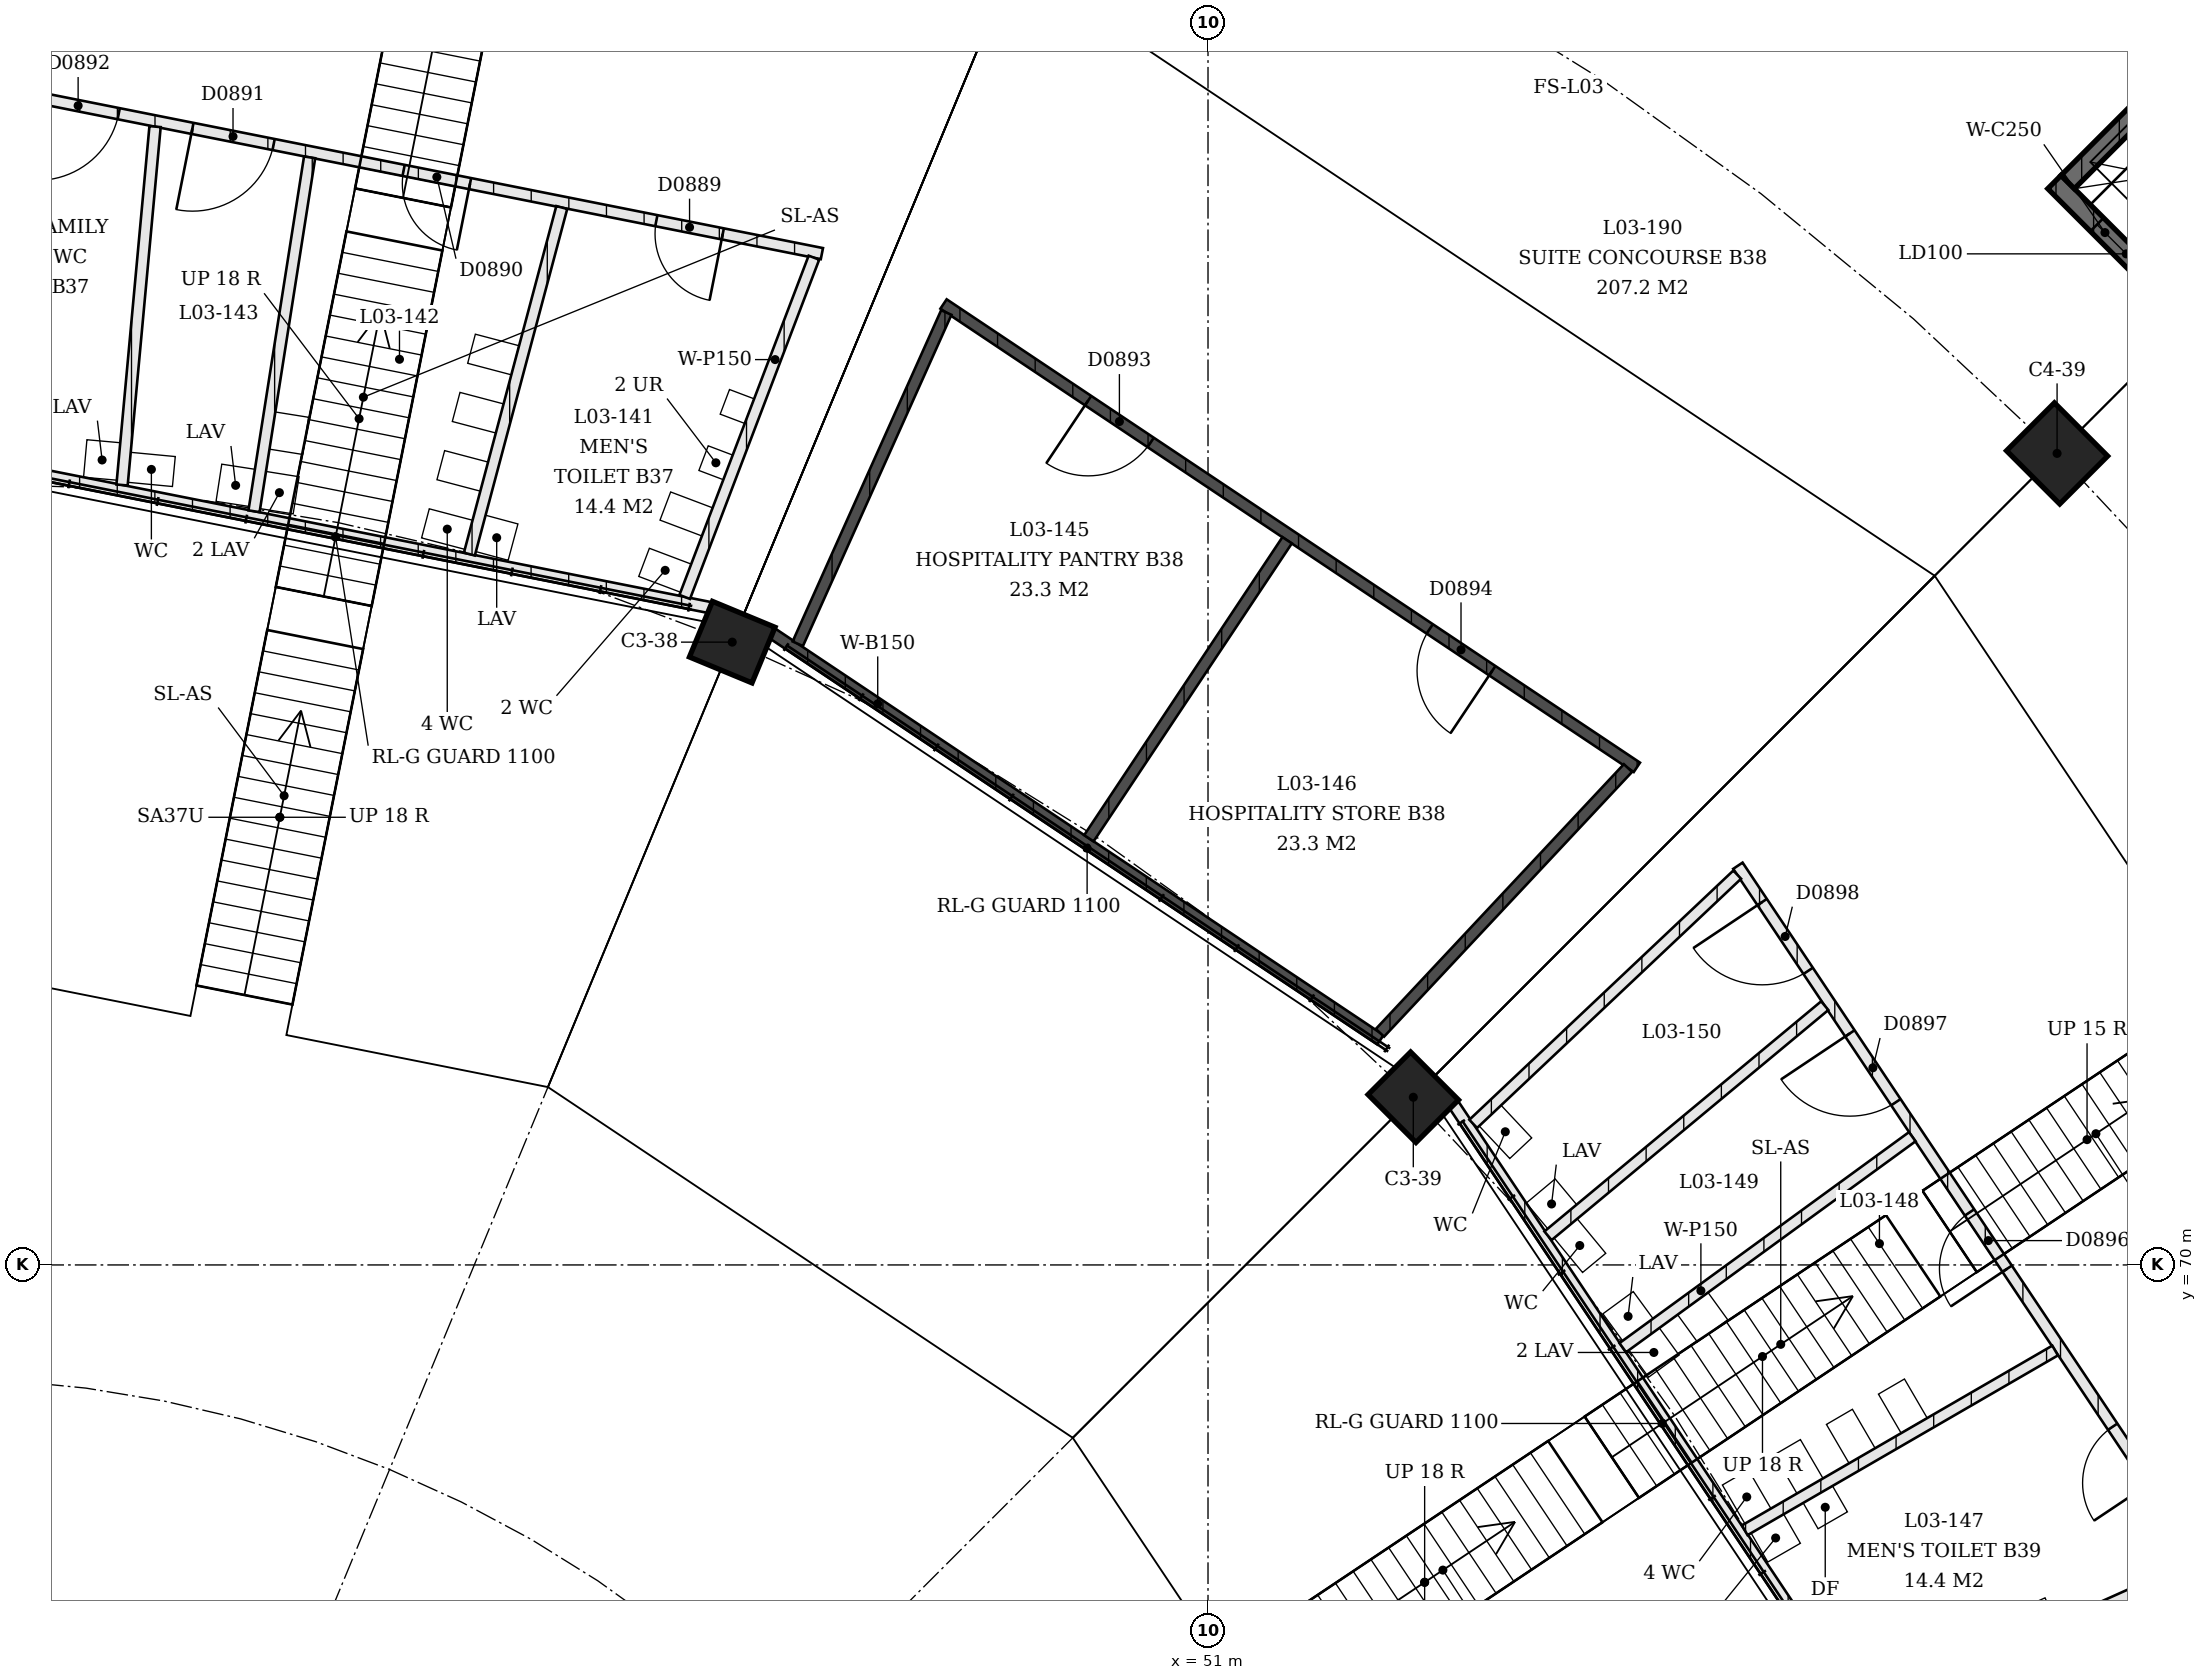
"""IFC4 building model, lengths in metres.
Left out: names, types, materials, properties, quantities, classifications, styles, units other than length and angle.
Written with IfcOpenShell. Run it as: python <this file> out.ifc"""

import sys

from ifc_helpers import new_model, si_unit, direction, frame, frame_2d, origin, origin_2d, place, context, subcontext, project, spatial, rectangle, extrude, element, fill, save


model = new_model("IFC4")
c1 = context("Model", 3, precision=1e-05, world=origin(), true_north=direction((0.0, 1.0)))
c2 = subcontext(c1, "Body", "Model", "MODEL_VIEW")
j1 = project(units=[si_unit("LENGTHUNIT", "METRE"), si_unit("PLANEANGLEUNIT", "RADIAN")], contexts=[c1])
p1 = place(None, origin())
s1 = spatial("IfcSite", under=j1, at=p1, CompositionType="ELEMENT")
p2 = place(p1, origin())
s2 = spatial("IfcBuilding", under=s1, at=p2, CompositionType="ELEMENT")
p3 = place(p2, frame((0.0, 0.0, 13.5)))
s3 = spatial("IfcBuildingStorey", under=s2, at=p3, CompositionType="ELEMENT", Elevation=13.5)
for number, where, z_axis, x_axis in (
    (1, (44.677, 78.276, 0.0), (0.0, 0.0, 1.0), (-0.924, 0.383, 0.0)),
    (2, (53.728, 72.228, 0.0), (0.0, 0.0, 1.0), (-0.707, 0.707, 0.0)),
):
    element("IfcColumn", number, at=place(p3, frame(where, z_axis=z_axis, x_axis=x_axis)), inside=s3, PredefinedType="COLUMN", context=c2, shape_type="SweptSolid", body=[
        extrude(rectangle(XDim=0.9, YDim=0.8, at=origin_2d()), origin(), (0.0, 0.0, 1.0), 2.033),
    ])
p4 = place(p3, frame((62.284, 80.784, 0.0), z_axis=(0.0, 0.0, 1.0), x_axis=(-0.707106781187, 0.707106781187, 0.0)))
e3 = element("IfcColumn", 3, at=p4, inside=s3, PredefinedType="COLUMN", context=c2, shape_type="SweptSolid", body=[
    extrude(rectangle(XDim=1.0, YDim=0.9, at=origin_2d()), origin(), (0.0, 0.0, 1.0), 4.5),
])
p5 = place(p3, frame((65.891, 80.749, 0.0), z_axis=(0.0, 0.0, 1.0), x_axis=(-0.707106781187, 0.707106781187, 0.0)))
e4 = element("IfcWall", 4, at=p5, inside=s3, PredefinedType="SHEAR", context=c2, shape_type="SweptSolid", body=[
    extrude(rectangle(XDim=5.15, YDim=0.25, at=frame_2d((2.575, 0.0))), origin(), (0.0, 0.0, 1.0), 4.09),
])
p6 = place(p5, frame((0.8, 0.0, 0.0)))
e5 = element("IfcOpeningElement", 5, at=p6, cuts=e4, PredefinedType="OPENING", context=c2, shape_type="SweptSolid", body=[
    extrude(rectangle(XDim=1.1, YDim=2.1, at=frame_2d((0.55, 1.05))), frame((0.0, 0.125, 0.0), z_axis=(0.0, -1.0, 0.0), x_axis=(1.0, 0.0, 0.0)), (0.0, 0.0, 1.0), 0.25),
])
p7 = place(p5, frame((3.25, 0.0, 0.0)))
e6 = element("IfcOpeningElement", 6, at=p7, cuts=e4, PredefinedType="OPENING", context=c2, shape_type="SweptSolid", body=[
    extrude(rectangle(XDim=1.1, YDim=2.1, at=frame_2d((0.55, 1.05))), frame((0.0, 0.125, 0.0), z_axis=(0.0, -1.0, 0.0), x_axis=(1.0, 0.0, 0.0)), (0.0, 0.0, 1.0), 0.25),
])
p8 = place(p3, frame((62.426, 84.391, 0.0), z_axis=(0.0, 0.0, 1.0), x_axis=(0.707147472125, 0.707066087907, 0.0)))
e7 = element("IfcWall", 7, at=p8, inside=s3, PredefinedType="SHEAR", context=c2, shape_type="SweptSolid", body=[
    extrude(rectangle(XDim=3.0, YDim=0.25, at=frame_2d((1.5, 0.0))), origin(), (0.0, 0.0, 1.0), 4.09),
])
p9 = place(p3, frame((44.38, 78.735, 0.0), z_axis=(0.0, 0.0, 1.0), x_axis=(-0.980786564352, 0.19508386706, 0.0)))
e8 = element("IfcWall", 8, at=p9, inside=s3, PredefinedType="PARTITIONING", context=c2, shape_type="SweptSolid", body=[
    extrude(rectangle(XDim=9.825, YDim=0.15, at=frame_2d((4.913, 0.0))), origin(), (0.0, 0.0, 1.0), 3.0),
])
p10 = place(p3, frame((45.869, 83.439, 0.0), z_axis=(0.0, 0.0, 1.0), x_axis=(-0.980786208969, 0.195085653744, 0.0)))
e9 = element("IfcWall", 9, at=p10, inside=s3, PredefinedType="PARTITIONING", context=c2, shape_type="SweptSolid", body=[
    extrude(rectangle(XDim=11.209, YDim=0.15, at=frame_2d((5.604, 0.0))), origin(), (0.0, 0.0, 1.0), 3.0),
])
p11 = place(p10, frame((1.343, 0.0, 0.0)))
e10 = element("IfcOpeningElement", 10, at=p11, cuts=e9, PredefinedType="OPENING", context=c2, shape_type="SweptSolid", body=[
    extrude(rectangle(XDim=0.9, YDim=2.1, at=frame_2d((0.45, 1.05))), frame((0.0, 0.075, 0.0), z_axis=(0.0, -1.0, 0.0), x_axis=(1.0, 0.0, 0.0)), (0.0, 0.0, 1.0), 0.15),
])
p12 = place(p10, frame((4.768, 0.0, 0.0)))
e11 = element("IfcOpeningElement", 11, at=p12, cuts=e9, PredefinedType="OPENING", context=c2, shape_type="SweptSolid", body=[
    extrude(rectangle(XDim=0.9, YDim=2.1, at=frame_2d((0.45, 1.05))), frame((0.0, 0.075, 0.0), z_axis=(0.0, -1.0, 0.0), x_axis=(1.0, 0.0, 0.0)), (0.0, 0.0, 1.0), 0.15),
])
p13 = place(p10, frame((7.43, 0.0, 0.0)))
e12 = element("IfcOpeningElement", 12, at=p13, cuts=e9, PredefinedType="OPENING", context=c2, shape_type="SweptSolid", body=[
    extrude(rectangle(XDim=1.1, YDim=2.1, at=frame_2d((0.55, 1.05))), frame((0.0, 0.075, 0.0), z_axis=(0.0, -1.0, 0.0), x_axis=(1.0, 0.0, 0.0)), (0.0, 0.0, 1.0), 0.15),
])
p14 = place(p10, frame((9.529, 0.0, 0.0)))
e13 = element("IfcOpeningElement", 13, at=p14, cuts=e9, PredefinedType="OPENING", context=c2, shape_type="SweptSolid", body=[
    extrude(rectangle(XDim=1.1, YDim=2.1, at=frame_2d((0.55, 1.05))), frame((0.0, 0.075, 0.0), z_axis=(0.0, -1.0, 0.0), x_axis=(1.0, 0.0, 0.0)), (0.0, 0.0, 1.0), 0.15),
])
p15 = place(p3, frame((44.045, 78.877, 0.0), z_axis=(0.0, 0.0, 1.0), x_axis=(0.355921670207, 0.934515791561, 0.0)))
e14 = element("IfcWall", 14, at=p15, inside=s3, PredefinedType="PARTITIONING", context=c2, shape_type="SweptSolid", body=[
    extrude(rectangle(XDim=4.824, YDim=0.15, at=frame_2d((2.412, 0.0))), origin(), (0.0, 0.0, 1.0), 3.0),
])
p16 = place(p3, frame((41.183, 79.446, 0.0), z_axis=(0.0, 0.0, 1.0), x_axis=(0.257618021969, 0.966246839455, 0.0)))
e15 = element("IfcWall", 15, at=p16, inside=s3, PredefinedType="PARTITIONING", context=c2, shape_type="SweptSolid", body=[
    extrude(rectangle(XDim=4.767, YDim=0.15, at=frame_2d((2.383, 0.0))), origin(), (0.0, 0.0, 1.0), 3.0),
])
p17 = place(p3, frame((38.322, 80.015, 0.0), z_axis=(0.0, 0.0, 1.0), x_axis=(0.155127731688, 0.987894420908, 0.0)))
e16 = element("IfcWall", 16, at=p17, inside=s3, PredefinedType="PARTITIONING", context=c2, shape_type="SweptSolid", body=[
    extrude(rectangle(XDim=4.761, YDim=0.15, at=frame_2d((2.38, 0.0))), origin(), (0.0, 0.0, 1.0), 3.0),
])
p18 = place(p3, frame((36.567, 80.364, 0.0), z_axis=(0.0, 0.0, 1.0), x_axis=(0.091727705385, 0.995784127241, 0.0)))
e17 = element("IfcWall", 17, at=p18, inside=s3, PredefinedType="PARTITIONING", context=c2, shape_type="SweptSolid", body=[
    extrude(rectangle(XDim=4.783, YDim=0.15, at=frame_2d((2.392, 0.0))), origin(), (0.0, 0.0, 1.0), 3.0),
])
p19 = place(p3, frame((45.211, 78.391, 0.0), z_axis=(0.0, 0.0, 1.0), x_axis=(0.831470078842, -0.555569534793, 0.0)))
e18 = element("IfcWall", 18, at=p19, inside=s3, PredefinedType="SOLIDWALL", context=c2, shape_type="SweptSolid", body=[
    extrude(rectangle(XDim=9.718, YDim=0.15, at=frame_2d((4.859, 0.0))), origin(), (0.0, 0.0, 1.0), 3.0),
])
p20 = place(p3, frame((47.485, 82.77, 0.0), z_axis=(0.0, 0.0, 1.0), x_axis=(0.831470287315, -0.555569222791, 0.0)))
e19 = element("IfcWall", 19, at=p20, inside=s3, PredefinedType="SOLIDWALL", context=c2, shape_type="SweptSolid", body=[
    extrude(rectangle(XDim=11.082, YDim=0.15, at=frame_2d((5.541, 0.0))), origin(), (0.0, 0.0, 1.0), 3.0),
])
p21 = place(p20, frame((2.311, 0.0, 0.0)))
e20 = element("IfcOpeningElement", 20, at=p21, cuts=e19, PredefinedType="OPENING", context=c2, shape_type="SweptSolid", body=[
    extrude(rectangle(XDim=1.0, YDim=2.1, at=frame_2d((0.5, 1.05))), frame((0.0, 0.075, 0.0), z_axis=(0.0, -1.0, 0.0), x_axis=(1.0, 0.0, 0.0)), (0.0, 0.0, 1.0), 0.15),
])
p22 = place(p20, frame((7.771, 0.0, 0.0)))
e21 = element("IfcOpeningElement", 21, at=p22, cuts=e19, PredefinedType="OPENING", context=c2, shape_type="SweptSolid", body=[
    extrude(rectangle(XDim=1.0, YDim=2.1, at=frame_2d((0.5, 1.05))), frame((0.0, 0.075, 0.0), z_axis=(0.0, -1.0, 0.0), x_axis=(1.0, 0.0, 0.0)), (0.0, 0.0, 1.0), 0.15),
])
p23 = place(p3, frame((45.548, 78.254, 0.0), z_axis=(0.0, 0.0, 1.0), x_axis=(0.409145990025, 0.912468935825, 0.0)))
e22 = element("IfcWall", 22, at=p23, inside=s3, PredefinedType="SOLIDWALL", context=c2, shape_type="SweptSolid", body=[
    extrude(rectangle(XDim=4.824, YDim=0.15, at=frame_2d((2.412, 0.0))), origin(), (0.0, 0.0, 1.0), 3.0),
])
p24 = place(p3, frame((49.417, 75.67, 0.0), z_axis=(0.0, 0.0, 1.0), x_axis=(0.553989356348, 0.832523749243, 0.0)))
e23 = element("IfcWall", 23, at=p24, inside=s3, PredefinedType="SOLIDWALL", context=c2, shape_type="SweptSolid", body=[
    extrude(rectangle(XDim=4.757, YDim=0.15, at=frame_2d((2.378, 0.0))), origin(), (0.0, 0.0, 1.0), 3.0),
])
p25 = place(p3, frame((53.285, 73.085, 0.0), z_axis=(0.0, 0.0, 1.0), x_axis=(0.68366483381, 0.729796132499, 0.0)))
e24 = element("IfcWall", 24, at=p25, inside=s3, PredefinedType="SOLIDWALL", context=c2, shape_type="SweptSolid", body=[
    extrude(rectangle(XDim=4.821, YDim=0.15, at=frame_2d((2.411, 0.0))), origin(), (0.0, 0.0, 1.0), 3.0),
])
p26 = place(p3, frame((59.891, 63.711, 0.0), z_axis=(0.0, 0.0, 1.0), x_axis=(-0.555562437394, 0.83147482112, 0.0)))
e25 = element("IfcWall", 25, at=p26, inside=s3, PredefinedType="PARTITIONING", context=c2, shape_type="SweptSolid", body=[
    extrude(rectangle(XDim=10.125, YDim=0.15, at=frame_2d((5.062, 0.0))), origin(), (0.0, 0.0, 1.0), 3.0),
])
p27 = place(p3, frame((64.27, 65.985, 0.0), z_axis=(0.0, 0.0, 1.0), x_axis=(-0.555569460176, 0.8314701287, 0.0)))
e26 = element("IfcWall", 26, at=p27, inside=s3, PredefinedType="PARTITIONING", context=c2, shape_type="SweptSolid", body=[
    extrude(rectangle(XDim=11.209, YDim=0.15, at=frame_2d((5.604, 0.0))), origin(), (0.0, 0.0, 1.0), 3.0),
])
p28 = place(p27, frame((1.343, 0.0, 0.0)))
e27 = element("IfcOpeningElement", 27, at=p28, cuts=e26, PredefinedType="OPENING", context=c2, shape_type="SweptSolid", body=[
    extrude(rectangle(XDim=0.9, YDim=2.1, at=frame_2d((0.45, 1.05))), frame((0.0, 0.075, 0.0), z_axis=(0.0, -1.0, 0.0), x_axis=(1.0, 0.0, 0.0)), (0.0, 0.0, 1.0), 0.15),
])
p29 = place(p27, frame((4.768, 0.0, 0.0)))
e28 = element("IfcOpeningElement", 28, at=p29, cuts=e26, PredefinedType="OPENING", context=c2, shape_type="SweptSolid", body=[
    extrude(rectangle(XDim=0.9, YDim=2.1, at=frame_2d((0.45, 1.05))), frame((0.0, 0.075, 0.0), z_axis=(0.0, -1.0, 0.0), x_axis=(1.0, 0.0, 0.0)), (0.0, 0.0, 1.0), 0.15),
])
p30 = place(p27, frame((7.43, 0.0, 0.0)))
e29 = element("IfcOpeningElement", 29, at=p30, cuts=e26, PredefinedType="OPENING", context=c2, shape_type="SweptSolid", body=[
    extrude(rectangle(XDim=1.1, YDim=2.1, at=frame_2d((0.55, 1.05))), frame((0.0, 0.075, 0.0), z_axis=(0.0, -1.0, 0.0), x_axis=(1.0, 0.0, 0.0)), (0.0, 0.0, 1.0), 0.15),
])
p31 = place(p27, frame((9.529, 0.0, 0.0)))
e30 = element("IfcOpeningElement", 30, at=p31, cuts=e26, PredefinedType="OPENING", context=c2, shape_type="SweptSolid", body=[
    extrude(rectangle(XDim=1.1, YDim=2.1, at=frame_2d((0.55, 1.05))), frame((0.0, 0.075, 0.0), z_axis=(0.0, -1.0, 0.0), x_axis=(1.0, 0.0, 0.0)), (0.0, 0.0, 1.0), 0.15),
])
p32 = place(p3, frame((59.754, 64.048, 0.0), z_axis=(0.0, 0.0, 1.0), x_axis=(0.912468935825, 0.409145990025, 0.0)))
e31 = element("IfcWall", 31, at=p32, inside=s3, PredefinedType="PARTITIONING", context=c2, shape_type="SweptSolid", body=[
    extrude(rectangle(XDim=4.824, YDim=0.15, at=frame_2d((2.412, 0.0))), origin(), (0.0, 0.0, 1.0), 3.0),
])
p33 = place(p3, frame((58.133, 66.474, 0.0), z_axis=(0.0, 0.0, 1.0), x_axis=(0.865401737421, 0.501078669341, 0.0)))
e32 = element("IfcWall", 32, at=p33, inside=s3, PredefinedType="PARTITIONING", context=c2, shape_type="SweptSolid", body=[
    extrude(rectangle(XDim=4.767, YDim=0.15, at=frame_2d((2.383, 0.0))), origin(), (0.0, 0.0, 1.0), 3.0),
])
p34 = place(p3, frame((56.512, 68.901, 0.0), z_axis=(0.0, 0.0, 1.0), x_axis=(0.808261251336, 0.588824039581, 0.0)))
e33 = element("IfcWall", 33, at=p34, inside=s3, PredefinedType="PARTITIONING", context=c2, shape_type="SweptSolid", body=[
    extrude(rectangle(XDim=4.761, YDim=0.15, at=frame_2d((2.38, 0.0))), origin(), (0.0, 0.0, 1.0), 3.0),
])
p35 = place(p3, frame((55.518, 70.388, 0.0), z_axis=(0.0, 0.0, 1.0), x_axis=(0.769023985067, 0.639219923337, 0.0)))
e34 = element("IfcWall", 34, at=p35, inside=s3, PredefinedType="PARTITIONING", context=c2, shape_type="SweptSolid", body=[
    extrude(rectangle(XDim=4.783, YDim=0.15, at=frame_2d((2.392, 0.0))), origin(), (0.0, 0.0, 1.0), 3.0),
])
p36 = place(p3, frame((54.525, 71.875, 0.0), z_axis=(0.0, 0.0, 1.0), x_axis=(0.727182951144, 0.686443701672, 0.0)))
e35 = element("IfcWall", 35, at=p36, inside=s3, PredefinedType="PARTITIONING", context=c2, shape_type="SweptSolid", body=[
    extrude(rectangle(XDim=4.824, YDim=0.15, at=frame_2d((2.412, 0.0))), origin(), (0.0, 0.0, 1.0), 3.0),
])
p37 = place(p7, origin())
e36 = element("IfcDoor", 36, at=p37, inside=s3, OperationType="SLIDING_TO_LEFT", PredefinedType="DOOR", context=c2, shape_type="SweptSolid", body=[
    extrude(rectangle(XDim=1.1, YDim=2.1, at=frame_2d((0.55, 1.05))), frame((0.0, 0.025, 0.0), z_axis=(0.0, -1.0, 0.0), x_axis=(1.0, 0.0, 0.0)), (0.0, 0.0, 1.0), 0.05),
])
fill(e6, e36)
p38 = place(p11, origin())
e37 = element("IfcDoor", 37, at=p38, inside=s3, OperationType="SINGLE_SWING_RIGHT", PredefinedType="DOOR", context=c2, shape_type="SweptSolid", body=[
    extrude(rectangle(XDim=0.9, YDim=2.1, at=frame_2d((0.45, 1.05))), frame((0.0, 0.025, 0.0), z_axis=(0.0, -1.0, 0.0), x_axis=(1.0, 0.0, 0.0)), (0.0, 0.0, 1.0), 0.05),
])
fill(e10, e37)
p39 = place(p12, origin())
e38 = element("IfcDoor", 38, at=p39, inside=s3, OperationType="SINGLE_SWING_RIGHT", PredefinedType="DOOR", context=c2, shape_type="SweptSolid", body=[
    extrude(rectangle(XDim=0.9, YDim=2.1, at=frame_2d((0.45, 1.05))), frame((0.0, 0.025, 0.0), z_axis=(0.0, -1.0, 0.0), x_axis=(1.0, 0.0, 0.0)), (0.0, 0.0, 1.0), 0.05),
])
fill(e11, e38)
p40 = place(p13, origin())
e39 = element("IfcDoor", 39, at=p40, inside=s3, OperationType="SINGLE_SWING_LEFT", PredefinedType="DOOR", context=c2, shape_type="SweptSolid", body=[
    extrude(rectangle(XDim=1.1, YDim=2.1, at=frame_2d((0.55, 1.05))), frame((0.0, 0.025, 0.0), z_axis=(0.0, -1.0, 0.0), x_axis=(1.0, 0.0, 0.0)), (0.0, 0.0, 1.0), 0.05),
])
fill(e12, e39)
p41 = place(p14, origin())
e40 = element("IfcDoor", 40, at=p41, inside=s3, OperationType="SINGLE_SWING_LEFT", PredefinedType="DOOR", context=c2, shape_type="SweptSolid", body=[
    extrude(rectangle(XDim=1.1, YDim=2.1, at=frame_2d((0.55, 1.05))), frame((0.0, 0.025, 0.0), z_axis=(0.0, -1.0, 0.0), x_axis=(1.0, 0.0, 0.0)), (0.0, 0.0, 1.0), 0.05),
])
fill(e13, e40)
p42 = place(p21, origin())
e41 = element("IfcDoor", 41, at=p42, inside=s3, OperationType="SINGLE_SWING_LEFT", PredefinedType="DOOR", context=c2, shape_type="SweptSolid", body=[
    extrude(rectangle(XDim=1.0, YDim=2.1, at=frame_2d((0.5, 1.05))), frame((0.0, 0.025, 0.0), z_axis=(0.0, -1.0, 0.0), x_axis=(1.0, 0.0, 0.0)), (0.0, 0.0, 1.0), 0.05),
])
fill(e20, e41)
p43 = place(p22, origin())
e42 = element("IfcDoor", 42, at=p43, inside=s3, OperationType="SINGLE_SWING_RIGHT", PredefinedType="DOOR", context=c2, shape_type="SweptSolid", body=[
    extrude(rectangle(XDim=1.0, YDim=2.1, at=frame_2d((0.5, 1.05))), frame((0.0, 0.025, 0.0), z_axis=(0.0, -1.0, 0.0), x_axis=(1.0, 0.0, 0.0)), (0.0, 0.0, 1.0), 0.05),
])
fill(e21, e42)
p44 = place(p28, origin())
e43 = element("IfcDoor", 43, at=p44, inside=s3, OperationType="SINGLE_SWING_RIGHT", PredefinedType="DOOR", context=c2, shape_type="SweptSolid", body=[
    extrude(rectangle(XDim=0.9, YDim=2.1, at=frame_2d((0.45, 1.05))), frame((0.0, 0.025, 0.0), z_axis=(0.0, -1.0, 0.0), x_axis=(1.0, 0.0, 0.0)), (0.0, 0.0, 1.0), 0.05),
])
fill(e27, e43)
p45 = place(p29, origin())
e44 = element("IfcDoor", 44, at=p45, inside=s3, OperationType="SINGLE_SWING_RIGHT", PredefinedType="DOOR", context=c2, shape_type="SweptSolid", body=[
    extrude(rectangle(XDim=0.9, YDim=2.1, at=frame_2d((0.45, 1.05))), frame((0.0, 0.025, 0.0), z_axis=(0.0, -1.0, 0.0), x_axis=(1.0, 0.0, 0.0)), (0.0, 0.0, 1.0), 0.05),
])
fill(e28, e44)
p46 = place(p30, origin())
e45 = element("IfcDoor", 45, at=p46, inside=s3, OperationType="SINGLE_SWING_LEFT", PredefinedType="DOOR", context=c2, shape_type="SweptSolid", body=[
    extrude(rectangle(XDim=1.1, YDim=2.1, at=frame_2d((0.55, 1.05))), frame((0.0, 0.025, 0.0), z_axis=(0.0, -1.0, 0.0), x_axis=(1.0, 0.0, 0.0)), (0.0, 0.0, 1.0), 0.05),
])
fill(e29, e45)
p47 = place(p31, origin())
e46 = element("IfcDoor", 46, at=p47, inside=s3, OperationType="SINGLE_SWING_LEFT", PredefinedType="DOOR", context=c2, shape_type="SweptSolid", body=[
    extrude(rectangle(XDim=1.1, YDim=2.1, at=frame_2d((0.55, 1.05))), frame((0.0, 0.025, 0.0), z_axis=(0.0, -1.0, 0.0), x_axis=(1.0, 0.0, 0.0)), (0.0, 0.0, 1.0), 0.05),
])
fill(e30, e46)
save(model, sys.argv[1])
